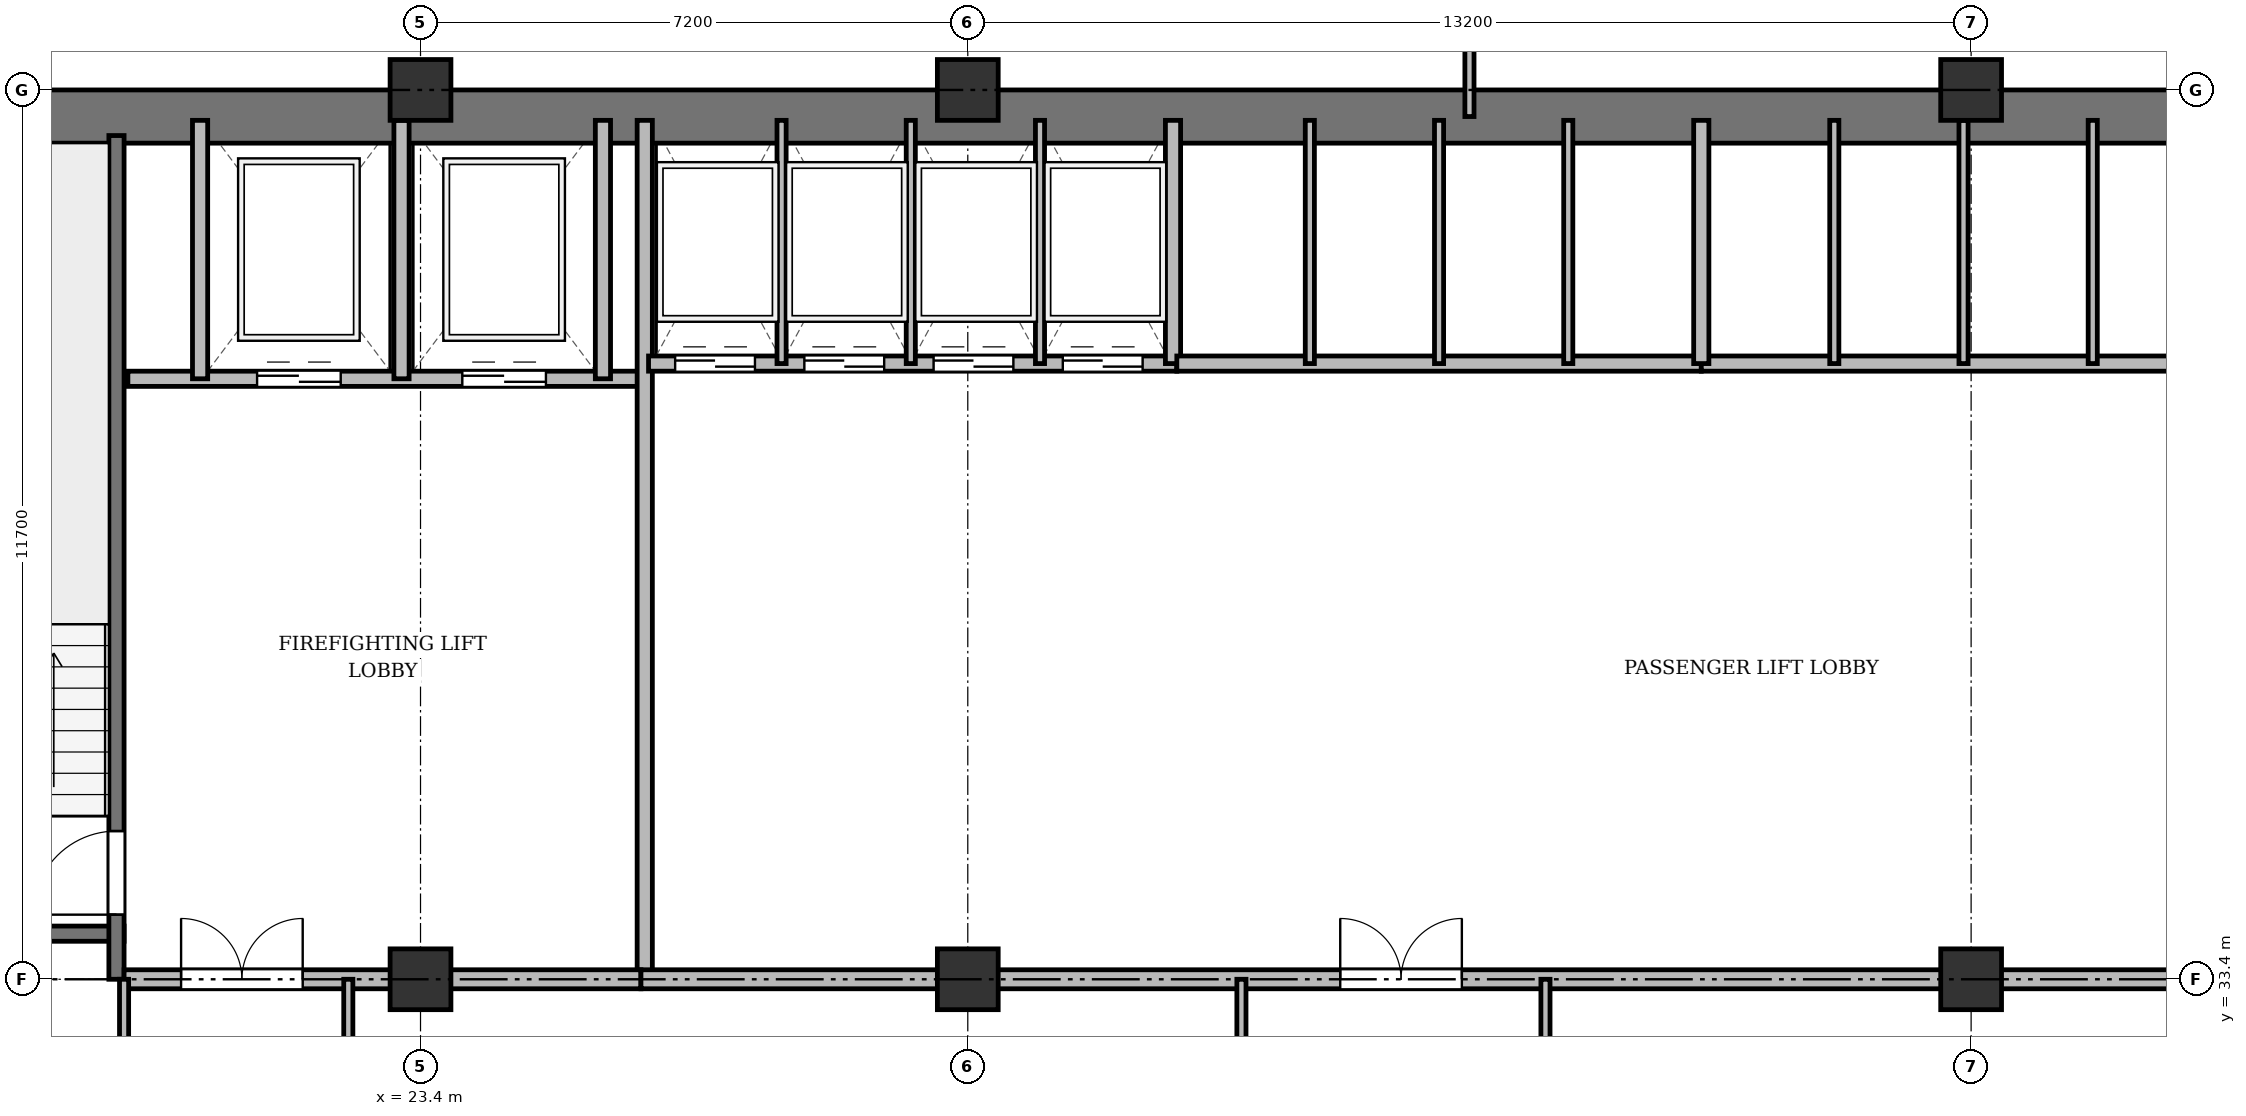
"""IFC4 building model, lengths in metres.
Left out: names, types, materials, properties, quantities, classifications, styles, units other than length and angle.
Written with IfcOpenShell. Run it as: python <this file> out.ifc"""

import sys

from ifc_helpers import new_model, si_unit, direction, frame, frame_2d, origin, origin_2d, place, context, subcontext, project, spatial, rectangle, extrude, source, transform, mapped, element, fill, save


model = new_model("IFC4")
c1 = context("Model", 3, precision=1e-05, world=origin(), true_north=direction((0.0, 1.0)))
c2 = subcontext(c1, "Body", "Model", "MODEL_VIEW")
j1 = project(units=[si_unit("LENGTHUNIT", "METRE"), si_unit("PLANEANGLEUNIT", "RADIAN")], contexts=[c1])
p1 = place(None, origin())
s1 = spatial("IfcSite", under=j1, at=p1, CompositionType="ELEMENT")
p2 = place(p1, origin())
s2 = spatial("IfcBuilding", under=s1, at=p2, CompositionType="ELEMENT")
p3 = place(p2, frame((0.0, 0.0, 99.7)))
s3 = spatial("IfcBuildingStorey", under=s2, at=p3, CompositionType="ELEMENT", Elevation=99.7)
m1 = source(origin(), c2, "Body", "SweptSolid", [
    extrude(rectangle(XDim=0.8, YDim=0.8, at=origin_2d()), origin(), (0.0, 0.0, 1.0), 3.6),
])
for number, where, z_axis, x_axis in (
    (1, (23.4, 33.4, 0.0), (0.0, 0.0, 1.0), (1.0, 0.0, 0.0)),
    (2, (23.4, 45.1, 0.0), (0.0, 0.0, 1.0), (1.0, 0.0, 0.0)),
    (3, (30.6, 33.4, 0.0), (0.0, 0.0, 1.0), (1.0, 0.0, 0.0)),
    (4, (30.6, 45.1, 0.0), (0.0, 0.0, 1.0), (1.0, 0.0, 0.0)),
    (5, (43.8, 33.4, 0.0), (0.0, 0.0, 1.0), (1.0, 0.0, 0.0)),
    (6, (43.8, 45.1, 0.0), (0.0, 0.0, 1.0), (1.0, 0.0, 0.0)),
):
    element("IfcColumn", number, at=place(p3, frame(where, z_axis=z_axis, x_axis=x_axis)), inside=s3, PredefinedType="COLUMN", context=c2, shape_type="MappedRepresentation", body=[
        mapped(m1, transform((0.0, 0.0, 0.0), x_axis=(1.0, 0.0, 0.0), y_axis=(0.0, 1.0, 0.0), z_axis=(0.0, 0.0, 1.0), scale=1.0)),
    ])
p4 = place(p3, frame((15.5, 44.75, 0.0), z_axis=(0.0, 0.0, 1.0), x_axis=(1.0, 0.0, 0.0)))
e7 = element("IfcWall", 7, at=p4, inside=s3, PredefinedType="SHEAR", context=c2, shape_type="SweptSolid", body=[
    extrude(rectangle(XDim=43.4, YDim=0.7, at=frame_2d((21.7, 0.0))), origin(), (0.0, 0.0, 1.0), 3.34),
])
p5 = place(p3, frame((16.1, 34.0, 0.0), z_axis=(0.0, 0.0, 1.0), x_axis=(1.0, 0.0, 0.0)))
e8 = element("IfcWall", 8, at=p5, inside=s3, PredefinedType="SHEAR", context=c2, shape_type="SweptSolid", body=[
    extrude(rectangle(XDim=3.4, YDim=0.2, at=frame_2d((1.7, 0.0))), origin(), (0.0, 0.0, 1.0), 3.34),
])
p6 = place(p3, frame((19.4, 33.4, 0.0), z_axis=(0.0, 0.0, 1.0), x_axis=(0.0, 1.0, 0.0)))
e9 = element("IfcWall", 9, at=p6, inside=s3, PredefinedType="SHEAR", context=c2, shape_type="SweptSolid", body=[
    extrude(rectangle(XDim=11.1, YDim=0.2, at=frame_2d((5.55, 0.0))), origin(), (0.0, 0.0, 1.0), 3.34),
])
p7 = place(p6, frame((0.85, 0.0, 0.0)))
e10 = element("IfcOpeningElement", 10, at=p7, cuts=e9, PredefinedType="OPENING", context=c2, shape_type="SweptSolid", body=[
    extrude(rectangle(XDim=1.1, YDim=2.15, at=frame_2d((0.55, 1.075))), frame((0.0, 0.11, 0.0), z_axis=(0.0, -1.0, 0.0), x_axis=(1.0, 0.0, 0.0)), (0.0, 0.0, 1.0), 0.22),
])
p8 = place(p3, frame((19.55, 41.3, 0.0), z_axis=(0.0, 0.0, 1.0), x_axis=(1.0, 0.0, 0.0)))
e11 = element("IfcWall", 11, at=p8, inside=s3, PredefinedType="SOLIDWALL", context=c2, shape_type="SweptSolid", body=[
    extrude(rectangle(XDim=6.75, YDim=0.2, at=frame_2d((3.375, 0.0))), origin(), (0.0, 0.0, 1.0), 3.34),
])
p9 = place(p8, frame((1.7, 0.0, 0.0)))
e12 = element("IfcOpeningElement", 12, at=p9, cuts=e11, PredefinedType="OPENING", context=c2, shape_type="SweptSolid", body=[
    extrude(rectangle(XDim=1.1, YDim=2.15, at=frame_2d((0.55, 1.075))), frame((0.0, 0.11, 0.0), z_axis=(0.0, -1.0, 0.0), x_axis=(1.0, 0.0, 0.0)), (0.0, 0.0, 1.0), 0.22),
])
p10 = place(p8, frame((4.4, 0.0, 0.0)))
e13 = element("IfcOpeningElement", 13, at=p10, cuts=e11, PredefinedType="OPENING", context=c2, shape_type="SweptSolid", body=[
    extrude(rectangle(XDim=1.1, YDim=2.15, at=frame_2d((0.55, 1.075))), frame((0.0, 0.11, 0.0), z_axis=(0.0, -1.0, 0.0), x_axis=(1.0, 0.0, 0.0)), (0.0, 0.0, 1.0), 0.22),
])
for number, where, z_axis, x_axis in (
    (14, (20.5, 41.3, 0.0), (0.0, 0.0, 1.0), (0.0, 1.0, 0.0)),
    (15, (23.15, 41.3, 0.0), (0.0, 0.0, 1.0), (0.0, 1.0, 0.0)),
    (16, (25.8, 41.3, 0.0), (0.0, 0.0, 1.0), (0.0, 1.0, 0.0)),
):
    element("IfcWall", number, at=place(p3, frame(where, z_axis=z_axis, x_axis=x_axis)), inside=s3, PredefinedType="SOLIDWALL", context=c2, shape_type="SweptSolid", body=[
        extrude(rectangle(XDim=3.4, YDim=0.2, at=frame_2d((1.7, 0.0))), origin(), (0.0, 0.0, 1.0), 3.34),
    ])
p11 = place(p3, frame((26.35, 33.4, 0.0), z_axis=(0.0, 0.0, 1.0), x_axis=(0.0, 1.0, 0.0)))
e17 = element("IfcWall", 17, at=p11, inside=s3, PredefinedType="SOLIDWALL", context=c2, shape_type="SweptSolid", body=[
    extrude(rectangle(XDim=11.3, YDim=0.2, at=frame_2d((5.65, 0.0))), origin(), (0.0, 0.0, 1.0), 2.752),
])
p12 = place(p3, frame((19.5, 33.4, 0.0), z_axis=(0.0, 0.0, 1.0), x_axis=(1.0, 0.0, 0.0)))
e18 = element("IfcWall", 18, at=p12, inside=s3, PredefinedType="PARTITIONING", context=c2, shape_type="SweptSolid", body=[
    extrude(rectangle(XDim=6.8, YDim=0.25, at=frame_2d((3.4, 0.0))), origin(), (0.0, 0.0, 1.0), 2.752),
])
p13 = place(p12, frame((0.75, 0.0, 0.0)))
e19 = element("IfcOpeningElement", 19, at=p13, cuts=e18, PredefinedType="OPENING", context=c2, shape_type="SweptSolid", body=[
    extrude(rectangle(XDim=1.6, YDim=2.2, at=frame_2d((0.8, 1.1))), frame((0.0, 0.135, 0.0), z_axis=(0.0, -1.0, 0.0), x_axis=(1.0, 0.0, 0.0)), (0.0, 0.0, 1.0), 0.27),
])
p14 = place(p3, frame((26.4, 41.5, 0.0), z_axis=(0.0, 0.0, 1.0), x_axis=(1.0, 0.0, 0.0)))
e20 = element("IfcWall", 20, at=p14, inside=s3, PredefinedType="SOLIDWALL", context=c2, shape_type="SweptSolid", body=[
    extrude(rectangle(XDim=6.95, YDim=0.2, at=frame_2d((3.475, 0.0))), origin(), (0.0, 0.0, 1.0), 3.34),
])
p15 = place(p14, frame((0.35, 0.0, 0.0)))
e21 = element("IfcOpeningElement", 21, at=p15, cuts=e20, PredefinedType="OPENING", context=c2, shape_type="SweptSolid", body=[
    extrude(rectangle(XDim=1.05, YDim=2.15, at=frame_2d((0.525, 1.075))), frame((0.0, 0.11, 0.0), z_axis=(0.0, -1.0, 0.0), x_axis=(1.0, 0.0, 0.0)), (0.0, 0.0, 1.0), 0.22),
])
p16 = place(p14, frame((2.05, 0.0, 0.0)))
e22 = element("IfcOpeningElement", 22, at=p16, cuts=e20, PredefinedType="OPENING", context=c2, shape_type="SweptSolid", body=[
    extrude(rectangle(XDim=1.05, YDim=2.15, at=frame_2d((0.525, 1.075))), frame((0.0, 0.11, 0.0), z_axis=(0.0, -1.0, 0.0), x_axis=(1.0, 0.0, 0.0)), (0.0, 0.0, 1.0), 0.22),
])
p17 = place(p14, frame((3.75, 0.0, 0.0)))
e23 = element("IfcOpeningElement", 23, at=p17, cuts=e20, PredefinedType="OPENING", context=c2, shape_type="SweptSolid", body=[
    extrude(rectangle(XDim=1.05, YDim=2.15, at=frame_2d((0.525, 1.075))), frame((0.0, 0.11, 0.0), z_axis=(0.0, -1.0, 0.0), x_axis=(1.0, 0.0, 0.0)), (0.0, 0.0, 1.0), 0.22),
])
p18 = place(p14, frame((5.45, 0.0, 0.0)))
e24 = element("IfcOpeningElement", 24, at=p18, cuts=e20, PredefinedType="OPENING", context=c2, shape_type="SweptSolid", body=[
    extrude(rectangle(XDim=1.05, YDim=2.15, at=frame_2d((0.525, 1.075))), frame((0.0, 0.11, 0.0), z_axis=(0.0, -1.0, 0.0), x_axis=(1.0, 0.0, 0.0)), (0.0, 0.0, 1.0), 0.22),
])
p19 = place(p3, frame((33.3, 41.5, 0.0), z_axis=(0.0, 0.0, 1.0), x_axis=(0.0, 1.0, 0.0)))
e25 = element("IfcWall", 25, at=p19, inside=s3, PredefinedType="SOLIDWALL", context=c2, shape_type="SweptSolid", body=[
    extrude(rectangle(XDim=3.2, YDim=0.2, at=frame_2d((1.6, 0.0))), origin(), (0.0, 0.0, 1.0), 3.34),
])
for number, where, z_axis, x_axis in (
    (26, (28.15, 41.5, 0.0), (0.0, 0.0, 1.0), (0.0, 1.0, 0.0)),
    (27, (29.85, 41.5, 0.0), (0.0, 0.0, 1.0), (0.0, 1.0, 0.0)),
    (28, (31.55, 41.5, 0.0), (0.0, 0.0, 1.0), (0.0, 1.0, 0.0)),
):
    element("IfcWall", number, at=place(p3, frame(where, z_axis=z_axis, x_axis=x_axis)), inside=s3, PredefinedType="PARTITIONING", context=c2, shape_type="SweptSolid", body=[
        extrude(rectangle(XDim=3.2, YDim=0.12, at=frame_2d((1.6, 0.0))), origin(), (0.0, 0.0, 1.0), 3.34),
    ])
p20 = place(p3, frame((33.35, 41.5, 0.0), z_axis=(0.0, 0.0, 1.0), x_axis=(1.0, 0.0, 0.0)))
e29 = element("IfcWall", 29, at=p20, inside=s3, PredefinedType="SOLIDWALL", context=c2, shape_type="SweptSolid", body=[
    extrude(rectangle(XDim=6.9, YDim=0.2, at=frame_2d((3.45, 0.0))), origin(), (0.0, 0.0, 1.0), 3.34),
])
for number, where, z_axis, x_axis in (
    (30, (35.1, 41.5, 0.0), (0.0, 0.0, 1.0), (0.0, 1.0, 0.0)),
    (31, (36.8, 41.5, 0.0), (0.0, 0.0, 1.0), (0.0, 1.0, 0.0)),
    (32, (38.5, 41.5, 0.0), (0.0, 0.0, 1.0), (0.0, 1.0, 0.0)),
):
    element("IfcWall", number, at=place(p3, frame(where, z_axis=z_axis, x_axis=x_axis)), inside=s3, PredefinedType="PARTITIONING", context=c2, shape_type="SweptSolid", body=[
        extrude(rectangle(XDim=3.2, YDim=0.12, at=frame_2d((1.6, 0.0))), origin(), (0.0, 0.0, 1.0), 3.34),
    ])
p21 = place(p3, frame((40.25, 41.5, 0.0), z_axis=(0.0, 0.0, 1.0), x_axis=(1.0, 0.0, 0.0)))
e33 = element("IfcWall", 33, at=p21, inside=s3, PredefinedType="SOLIDWALL", context=c2, shape_type="SweptSolid", body=[
    extrude(rectangle(XDim=6.9, YDim=0.2, at=frame_2d((3.45, 0.0))), origin(), (0.0, 0.0, 1.0), 2.84),
])
p22 = place(p3, frame((40.25, 41.5, 0.0), z_axis=(0.0, 0.0, 1.0), x_axis=(0.0, 1.0, 0.0)))
e34 = element("IfcWall", 34, at=p22, inside=s3, PredefinedType="SOLIDWALL", context=c2, shape_type="SweptSolid", body=[
    extrude(rectangle(XDim=3.2, YDim=0.2, at=frame_2d((1.6, 0.0))), origin(), (0.0, 0.0, 1.0), 3.34),
])
p23 = place(p3, frame((42.0, 41.5, 0.0), z_axis=(0.0, 0.0, 1.0), x_axis=(0.0, 1.0, 0.0)))
e35 = element("IfcWall", 35, at=p23, inside=s3, PredefinedType="PARTITIONING", context=c2, shape_type="SweptSolid", body=[
    extrude(rectangle(XDim=3.2, YDim=0.12, at=frame_2d((1.6, 0.0))), origin(), (0.0, 0.0, 1.0), 3.34),
])
p24 = place(p3, frame((43.7, 41.5, 0.0), z_axis=(0.0, 0.0, 1.0), x_axis=(0.0, 1.0, 0.0)))
e36 = element("IfcWall", 36, at=p24, inside=s3, PredefinedType="PARTITIONING", context=c2, shape_type="SweptSolid", body=[
    extrude(rectangle(XDim=3.2, YDim=0.12, at=frame_2d((1.6, 0.0))), origin(), (0.0, 0.0, 1.0), 2.84),
])
p25 = place(p3, frame((45.4, 41.5, 0.0), z_axis=(0.0, 0.0, 1.0), x_axis=(0.0, 1.0, 0.0)))
e37 = element("IfcWall", 37, at=p25, inside=s3, PredefinedType="PARTITIONING", context=c2, shape_type="SweptSolid", body=[
    extrude(rectangle(XDim=3.2, YDim=0.12, at=frame_2d((1.6, 0.0))), origin(), (0.0, 0.0, 1.0), 3.34),
])
p26 = place(p3, frame((26.3, 33.4, 0.0), z_axis=(0.0, 0.0, 1.0), x_axis=(1.0, 0.0, 0.0)))
e38 = element("IfcWall", 38, at=p26, inside=s3, PredefinedType="PARTITIONING", context=c2, shape_type="SweptSolid", body=[
    extrude(rectangle(XDim=20.85, YDim=0.25, at=frame_2d((10.425, 0.0))), origin(), (0.0, 0.0, 1.0), 2.752),
])
p27 = place(p26, frame((9.2, 0.0, 0.0)))
e39 = element("IfcOpeningElement", 39, at=p27, cuts=e38, PredefinedType="OPENING", context=c2, shape_type="SweptSolid", body=[
    extrude(rectangle(XDim=1.6, YDim=2.2, at=frame_2d((0.8, 1.1))), frame((0.0, 0.135, 0.0), z_axis=(0.0, -1.0, 0.0), x_axis=(1.0, 0.0, 0.0)), (0.0, 0.0, 1.0), 0.27),
])
for number, where, z_axis, x_axis in (
    (40, (19.5, 29.8, 0.0), (0.0, 0.0, 1.0), (0.0, 1.0, 0.0)),
    (41, (22.45, 29.8, 0.0), (0.0, 0.0, 1.0), (0.0, 1.0, 0.0)),
    (42, (34.2, 29.8, 0.0), (0.0, 0.0, 1.0), (0.0, 1.0, 0.0)),
    (43, (38.2, 29.8, 0.0), (0.0, 0.0, 1.0), (0.0, 1.0, 0.0)),
):
    element("IfcWall", number, at=place(p3, frame(where, z_axis=z_axis, x_axis=x_axis)), inside=s3, PredefinedType="PARTITIONING", context=c2, shape_type="SweptSolid", body=[
        extrude(rectangle(XDim=3.6, YDim=0.12, at=frame_2d((1.8, 0.0))), origin(), (0.0, 0.0, 1.0), 2.752),
    ])
p28 = place(p3, frame((37.2, 44.75, 0.0), z_axis=(0.0, 0.0, 1.0), x_axis=(0.0, 1.0, 0.0)))
e44 = element("IfcWall", 44, at=p28, inside=s3, PredefinedType="PARTITIONING", context=c2, shape_type="SweptSolid", body=[
    extrude(rectangle(XDim=3.61, YDim=0.12, at=frame_2d((1.805, 0.0))), origin(), (0.0, 0.0, 1.0), 2.752),
])
p29 = place(p28, frame((1.1, 0.0, 0.0)))
e45 = element("IfcOpeningElement", 45, at=p29, cuts=e44, PredefinedType="OPENING", context=c2, shape_type="SweptSolid", body=[
    extrude(rectangle(XDim=0.95, YDim=2.15, at=frame_2d((0.475, 1.075))), frame((0.0, 0.07, 0.0), z_axis=(0.0, -1.0, 0.0), x_axis=(1.0, 0.0, 0.0)), (0.0, 0.0, 1.0), 0.14),
])
m2 = source(origin(), c2, "Body", "SweptSolid", [
    extrude(rectangle(XDim=1.1, YDim=2.15, at=frame_2d((0.55, 1.075))), frame((0.0, 0.025, 0.0), z_axis=(0.0, -1.0, 0.0), x_axis=(1.0, 0.0, 0.0)), (0.0, 0.0, 1.0), 0.05),
])
p30 = place(p7, origin())
e46 = element("IfcDoor", 46, at=p30, inside=s3, OperationType="SINGLE_SWING_LEFT", PredefinedType="DOOR", context=c2, shape_type="MappedRepresentation", body=[
    mapped(m2, transform((0.0, 0.0, 0.0), x_axis=(1.0, 0.0, 0.0), y_axis=(0.0, 1.0, 0.0), z_axis=(0.0, 0.0, 1.0), scale=1.0)),
])
fill(e10, e46)
p31 = place(p9, origin())
e47 = element("IfcDoor", 47, at=p31, inside=s3, OperationType="DOUBLE_DOOR_SLIDING", PredefinedType="DOOR", context=c2, shape_type="MappedRepresentation", body=[
    mapped(m2, transform((0.0, 0.0, 0.0), x_axis=(1.0, 0.0, 0.0), y_axis=(0.0, 1.0, 0.0), z_axis=(0.0, 0.0, 1.0), scale=1.0)),
])
fill(e12, e47)
p32 = place(p10, origin())
e48 = element("IfcDoor", 48, at=p32, inside=s3, OperationType="DOUBLE_DOOR_SLIDING", PredefinedType="DOOR", context=c2, shape_type="MappedRepresentation", body=[
    mapped(m2, transform((0.0, 0.0, 0.0), x_axis=(1.0, 0.0, 0.0), y_axis=(0.0, 1.0, 0.0), z_axis=(0.0, 0.0, 1.0), scale=1.0)),
])
fill(e13, e48)
m3 = source(origin(), c2, "Body", "SweptSolid", [
    extrude(rectangle(XDim=1.6, YDim=2.2, at=frame_2d((0.8, 1.1))), frame((0.0, 0.025, 0.0), z_axis=(0.0, -1.0, 0.0), x_axis=(1.0, 0.0, 0.0)), (0.0, 0.0, 1.0), 0.05),
])
p33 = place(p13, origin())
e49 = element("IfcDoor", 49, at=p33, inside=s3, OperationType="DOUBLE_DOOR_SINGLE_SWING", PredefinedType="DOOR", context=c2, shape_type="MappedRepresentation", body=[
    mapped(m3, transform((0.0, 0.0, 0.0), x_axis=(1.0, 0.0, 0.0), y_axis=(0.0, 1.0, 0.0), z_axis=(0.0, 0.0, 1.0), scale=1.0)),
])
fill(e19, e49)
m4 = source(origin(), c2, "Body", "SweptSolid", [
    extrude(rectangle(XDim=1.05, YDim=2.15, at=frame_2d((0.525, 1.075))), frame((0.0, 0.025, 0.0), z_axis=(0.0, -1.0, 0.0), x_axis=(1.0, 0.0, 0.0)), (0.0, 0.0, 1.0), 0.05),
])
p34 = place(p15, origin())
e50 = element("IfcDoor", 50, at=p34, inside=s3, OperationType="DOUBLE_DOOR_SLIDING", PredefinedType="DOOR", context=c2, shape_type="MappedRepresentation", body=[
    mapped(m4, transform((0.0, 0.0, 0.0), x_axis=(1.0, 0.0, 0.0), y_axis=(0.0, 1.0, 0.0), z_axis=(0.0, 0.0, 1.0), scale=1.0)),
])
fill(e21, e50)
p35 = place(p16, origin())
e51 = element("IfcDoor", 51, at=p35, inside=s3, OperationType="DOUBLE_DOOR_SLIDING", PredefinedType="DOOR", context=c2, shape_type="MappedRepresentation", body=[
    mapped(m4, transform((0.0, 0.0, 0.0), x_axis=(1.0, 0.0, 0.0), y_axis=(0.0, 1.0, 0.0), z_axis=(0.0, 0.0, 1.0), scale=1.0)),
])
fill(e22, e51)
p36 = place(p17, origin())
e52 = element("IfcDoor", 52, at=p36, inside=s3, OperationType="DOUBLE_DOOR_SLIDING", PredefinedType="DOOR", context=c2, shape_type="MappedRepresentation", body=[
    mapped(m4, transform((0.0, 0.0, 0.0), x_axis=(1.0, 0.0, 0.0), y_axis=(0.0, 1.0, 0.0), z_axis=(0.0, 0.0, 1.0), scale=1.0)),
])
fill(e23, e52)
p37 = place(p18, origin())
e53 = element("IfcDoor", 53, at=p37, inside=s3, OperationType="DOUBLE_DOOR_SLIDING", PredefinedType="DOOR", context=c2, shape_type="MappedRepresentation", body=[
    mapped(m4, transform((0.0, 0.0, 0.0), x_axis=(1.0, 0.0, 0.0), y_axis=(0.0, 1.0, 0.0), z_axis=(0.0, 0.0, 1.0), scale=1.0)),
])
fill(e24, e53)
p38 = place(p27, origin())
e54 = element("IfcDoor", 54, at=p38, inside=s3, OperationType="DOUBLE_DOOR_SINGLE_SWING", PredefinedType="DOOR", context=c2, shape_type="MappedRepresentation", body=[
    mapped(m3, transform((0.0, 0.0, 0.0), x_axis=(1.0, 0.0, 0.0), y_axis=(0.0, 1.0, 0.0), z_axis=(0.0, 0.0, 1.0), scale=1.0)),
])
fill(e39, e54)
save(model, sys.argv[1])
